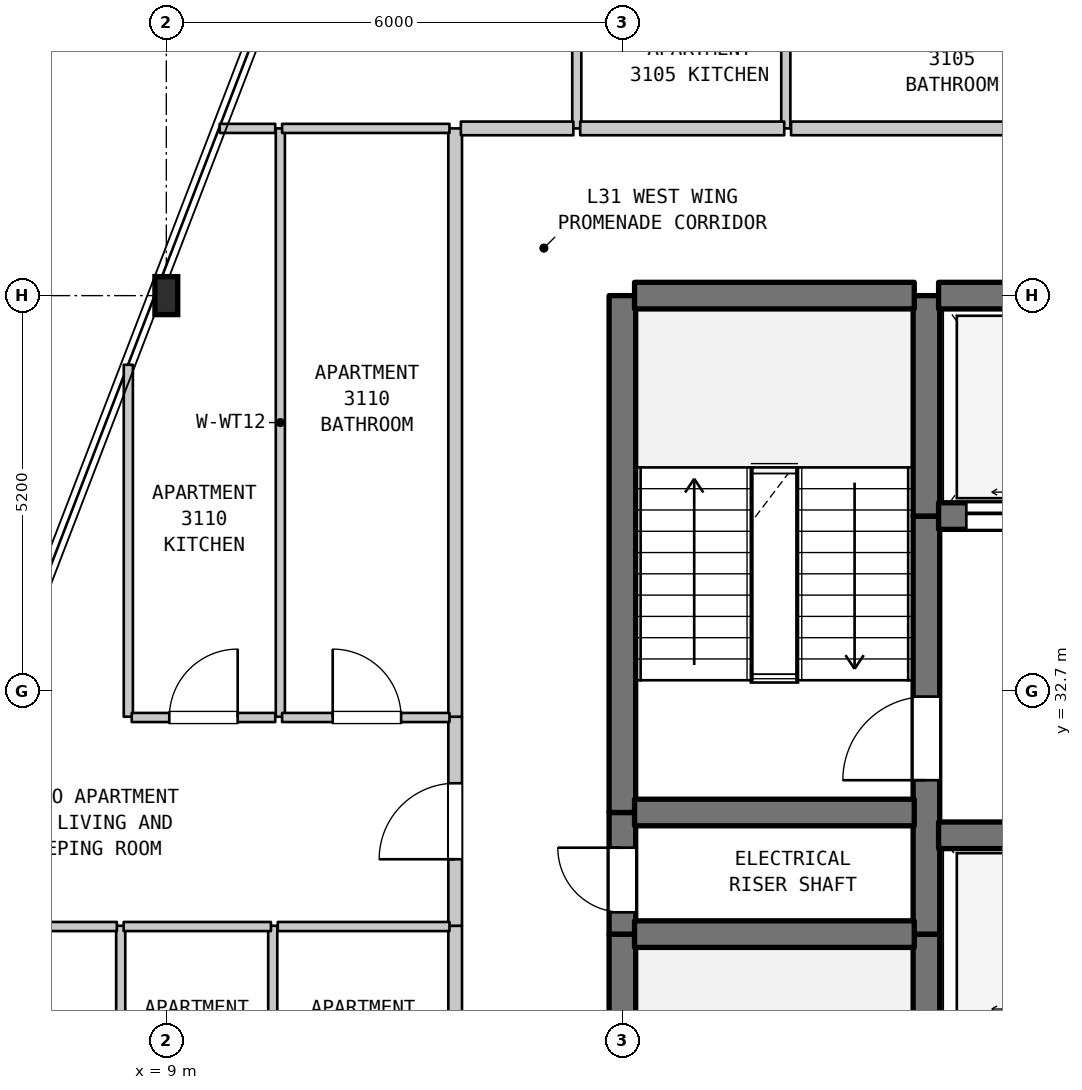
"""IFC4 building model, lengths in metres.
Left out: names, types, materials, properties, quantities, classifications, styles, units other than length and angle.
Written with IfcOpenShell. Run it as: python <this file> out.ifc"""

import sys

from ifc_helpers import new_model, si_unit, direction, frame, frame_2d, origin, origin_2d, place, context, subcontext, project, spatial, rectangle, i_section, extrude, element, fill, save


model = new_model("IFC4")
c1 = context("Model", 3, precision=1e-05, world=origin(), true_north=direction((0.0, 1.0)))
c2 = subcontext(c1, "Body", "Model", "MODEL_VIEW")
j1 = project(units=[si_unit("LENGTHUNIT", "METRE"), si_unit("PLANEANGLEUNIT", "RADIAN")], contexts=[c1])
p1 = place(None, origin())
s1 = spatial("IfcSite", under=j1, at=p1, CompositionType="ELEMENT")
p2 = place(p1, origin())
s2 = spatial("IfcBuilding", under=s1, at=p2, CompositionType="ELEMENT")
p3 = place(p2, frame((0.0, 0.0, 129.8)))
s3 = spatial("IfcBuildingStorey", under=s2, at=p3, CompositionType="ELEMENT", Elevation=129.8)
p4 = place(p3, frame((9.0, 37.9, 0.0), z_axis=(0.0, 0.0, 1.0), x_axis=(1.0, 0.0, 0.0)))
e1 = element("IfcColumn", 1, at=p4, inside=s3, PredefinedType="COLUMN", context=c2, shape_type="SweptSolid", body=[
    extrude(i_section(OverallWidth=0.3, OverallDepth=0.5, WebThickness=0.014, FlangeThickness=0.028, FilletRadius=0.027, at=origin_2d()), origin(), (0.0, 0.0, 1.0), 3.7),
])
p5 = place(p3, frame((8.4, 26.16, 0.0), z_axis=(0.0, 0.0, 1.0), x_axis=(0.0, 1.0, 0.0)))
e2 = element("IfcWall", 2, at=p5, inside=s3, PredefinedType="PARTITIONING", context=c2, shape_type="SweptSolid", body=[
    extrude(rectangle(XDim=3.45, YDim=0.12, at=frame_2d((1.725, 0.0))), origin(), (0.0, 0.0, 1.0), 3.385),
])
p6 = place(p3, frame((8.5, 32.36, 0.0), z_axis=(0.0, 0.0, 1.0), x_axis=(0.0, 1.0, 0.0)))
e3 = element("IfcWall", 3, at=p6, inside=s3, PredefinedType="PARTITIONING", context=c2, shape_type="SweptSolid", body=[
    extrude(rectangle(XDim=4.63, YDim=0.12, at=frame_2d((2.315, 0.0))), origin(), (0.0, 0.0, 1.0), 3.385),
])
p7 = place(p3, frame((10.4, 26.16, 0.0), z_axis=(0.0, 0.0, 1.0), x_axis=(0.0, 1.0, 0.0)))
e4 = element("IfcWall", 4, at=p7, inside=s3, PredefinedType="PARTITIONING", context=c2, shape_type="SweptSolid", body=[
    extrude(rectangle(XDim=3.45, YDim=0.12, at=frame_2d((1.725, 0.0))), origin(), (0.0, 0.0, 1.0), 3.385),
])
p8 = place(p3, frame((10.5, 32.36, 0.0), z_axis=(0.0, 0.0, 1.0), x_axis=(0.0, 1.0, 0.0)))
e5 = element("IfcWall", 5, at=p8, inside=s3, PredefinedType="PARTITIONING", context=c2, shape_type="SweptSolid", body=[
    extrude(rectangle(XDim=7.74, YDim=0.12, at=frame_2d((3.87, 0.0))), origin(), (0.0, 0.0, 1.0), 3.385),
])
p9 = place(p3, frame((12.8, 26.16, 0.0), z_axis=(0.0, 0.0, 1.0), x_axis=(0.0, 1.0, 0.0)))
e6 = element("IfcWall", 6, at=p9, inside=s3, PredefinedType="STANDARD", context=c2, shape_type="SweptSolid", body=[
    extrude(rectangle(XDim=3.45, YDim=0.18, at=frame_2d((1.725, 0.0))), origin(), (0.0, 0.0, 1.0), 3.385),
])
p10 = place(p3, frame((12.8, 29.61, 0.0), z_axis=(0.0, 0.0, 1.0), x_axis=(0.0, 1.0, 0.0)))
e7 = element("IfcWall", 7, at=p10, inside=s3, PredefinedType="STANDARD", context=c2, shape_type="SweptSolid", body=[
    extrude(rectangle(XDim=2.75, YDim=0.18, at=frame_2d((1.375, 0.0))), origin(), (0.0, 0.0, 1.0), 3.385),
])
p11 = place(p10, frame((0.875, 0.0, 0.0)))
e8 = element("IfcOpeningElement", 8, at=p11, cuts=e7, PredefinedType="OPENING", context=c2, shape_type="SweptSolid", body=[
    extrude(rectangle(XDim=1.0, YDim=2.15, at=frame_2d((0.5, 1.075))), frame((0.0, 0.1, 0.0), z_axis=(0.0, -1.0, 0.0), x_axis=(1.0, 0.0, 0.0)), (0.0, 0.0, 1.0), 0.2),
])
p12 = place(p3, frame((12.8, 32.36, 0.0), z_axis=(0.0, 0.0, 1.0), x_axis=(0.0, 1.0, 0.0)))
e9 = element("IfcWall", 9, at=p12, inside=s3, PredefinedType="STANDARD", context=c2, shape_type="SweptSolid", body=[
    extrude(rectangle(XDim=7.74, YDim=0.18, at=frame_2d((3.87, 0.0))), origin(), (0.0, 0.0, 1.0), 3.385),
])
p13 = place(p3, frame((14.4, 40.1, 0.0), z_axis=(0.0, 0.0, 1.0), x_axis=(0.0, 1.0, 0.0)))
e10 = element("IfcWall", 10, at=p13, inside=s3, PredefinedType="PARTITIONING", context=c2, shape_type="SweptSolid", body=[
    extrude(rectangle(XDim=2.3, YDim=0.12, at=frame_2d((1.15, 0.0))), origin(), (0.0, 0.0, 1.0), 3.385),
])
p14 = place(p3, frame((15.0, 22.7, 0.0), z_axis=(0.0, 0.0, 1.0), x_axis=(0.0, 1.0, 0.0)))
e11 = element("IfcWall", 11, at=p14, inside=s3, PredefinedType="SHEAR", context=c2, shape_type="SweptSolid", body=[
    extrude(rectangle(XDim=6.8, YDim=0.35, at=frame_2d((3.4, 0.0))), origin(), (0.0, 0.0, 1.0), 3.385),
])
p15 = place(p3, frame((15.0, 29.5, 0.0), z_axis=(0.0, 0.0, 1.0), x_axis=(0.0, 1.0, 0.0)))
e12 = element("IfcWall", 12, at=p15, inside=s3, PredefinedType="SHEAR", context=c2, shape_type="SweptSolid", body=[
    extrude(rectangle(XDim=1.6, YDim=0.35, at=frame_2d((0.8, 0.0))), origin(), (0.0, 0.0, 1.0), 3.385),
])
p16 = place(p15, frame((0.287, 0.0, 0.0)))
e13 = element("IfcOpeningElement", 13, at=p16, cuts=e12, PredefinedType="OPENING", context=c2, shape_type="SweptSolid", body=[
    extrude(rectangle(XDim=0.85, YDim=2.1, at=frame_2d((0.425, 1.05))), frame((0.0, 0.185, 0.0), z_axis=(0.0, -1.0, 0.0), x_axis=(1.0, 0.0, 0.0)), (0.0, 0.0, 1.0), 0.37),
])
p17 = place(p3, frame((15.0, 31.1, 0.0), z_axis=(0.0, 0.0, 1.0), x_axis=(0.0, 1.0, 0.0)))
e14 = element("IfcWall", 14, at=p17, inside=s3, PredefinedType="SHEAR", context=c2, shape_type="SweptSolid", body=[
    extrude(rectangle(XDim=6.8, YDim=0.35, at=frame_2d((3.4, 0.0))), origin(), (0.0, 0.0, 1.0), 3.385),
])
p18 = place(p3, frame((17.15, 40.1, 0.0), z_axis=(0.0, 0.0, 1.0), x_axis=(0.0, 1.0, 0.0)))
e15 = element("IfcWall", 15, at=p18, inside=s3, PredefinedType="PARTITIONING", context=c2, shape_type="SweptSolid", body=[
    extrude(rectangle(XDim=2.3, YDim=0.12, at=frame_2d((1.15, 0.0))), origin(), (0.0, 0.0, 1.0), 3.385),
])
p19 = place(p3, frame((19.0, 28.2, 0.0), z_axis=(0.0, 0.0, 1.0), x_axis=(0.0, 1.0, 0.0)))
e16 = element("IfcWall", 16, at=p19, inside=s3, PredefinedType="SHEAR", context=c2, shape_type="SweptSolid", body=[
    extrude(rectangle(XDim=1.3, YDim=0.35, at=frame_2d((0.65, 0.0))), origin(), (0.0, 0.0, 1.0), 3.385),
])
p20 = place(p3, frame((19.0, 29.5, 0.0), z_axis=(0.0, 0.0, 1.0), x_axis=(0.0, 1.0, 0.0)))
e17 = element("IfcWall", 17, at=p20, inside=s3, PredefinedType="SHEAR", context=c2, shape_type="SweptSolid", body=[
    extrude(rectangle(XDim=5.5, YDim=0.35, at=frame_2d((2.75, 0.0))), origin(), (0.0, 0.0, 1.0), 3.385),
])
p21 = place(p20, frame((2.025, 0.0, 0.0)))
e18 = element("IfcOpeningElement", 18, at=p21, cuts=e17, PredefinedType="OPENING", context=c2, shape_type="SweptSolid", body=[
    extrude(rectangle(XDim=1.1, YDim=2.15, at=frame_2d((0.55, 1.075))), frame((0.0, 0.185, 0.0), z_axis=(0.0, -1.0, 0.0), x_axis=(1.0, 0.0, 0.0)), (0.0, 0.0, 1.0), 0.37),
])
p22 = place(p3, frame((19.0, 35.0, 0.0), z_axis=(0.0, 0.0, 1.0), x_axis=(0.0, 1.0, 0.0)))
e19 = element("IfcWall", 19, at=p22, inside=s3, PredefinedType="SHEAR", context=c2, shape_type="SweptSolid", body=[
    extrude(rectangle(XDim=2.9, YDim=0.35, at=frame_2d((1.45, 0.0))), origin(), (0.0, 0.0, 1.0), 3.385),
])
p23 = place(p3, frame((15.16, 29.5, 0.0), z_axis=(0.0, 0.0, 1.0), x_axis=(1.0, 0.0, 0.0)))
e20 = element("IfcWall", 20, at=p23, inside=s3, PredefinedType="SHEAR", context=c2, shape_type="SweptSolid", body=[
    extrude(rectangle(XDim=3.68, YDim=0.35, at=frame_2d((1.84, 0.0))), origin(), (0.0, 0.0, 1.0), 3.385),
])
p24 = place(p3, frame((5.664, 29.6, 0.0), z_axis=(0.0, 0.0, 1.0), x_axis=(1.0, 0.0, 0.0)))
e21 = element("IfcWall", 21, at=p24, inside=s3, PredefinedType="PARTITIONING", context=c2, shape_type="SweptSolid", body=[
    extrude(rectangle(XDim=2.685, YDim=0.12, at=frame_2d((1.343, 0.0))), origin(), (0.0, 0.0, 1.0), 3.385),
])
p25 = place(p3, frame((8.439, 29.6, 0.0), z_axis=(0.0, 0.0, 1.0), x_axis=(1.0, 0.0, 0.0)))
e22 = element("IfcWall", 22, at=p25, inside=s3, PredefinedType="PARTITIONING", context=c2, shape_type="SweptSolid", body=[
    extrude(rectangle(XDim=1.937, YDim=0.12, at=frame_2d((0.969, 0.0))), origin(), (0.0, 0.0, 1.0), 3.385),
])
p26 = place(p3, frame((10.466, 29.6, 0.0), z_axis=(0.0, 0.0, 1.0), x_axis=(1.0, 0.0, 0.0)))
e23 = element("IfcWall", 23, at=p26, inside=s3, PredefinedType="PARTITIONING", context=c2, shape_type="SweptSolid", body=[
    extrude(rectangle(XDim=2.259, YDim=0.12, at=frame_2d((1.129, 0.0))), origin(), (0.0, 0.0, 1.0), 3.385),
])
p27 = place(p3, frame((19.16, 30.8, 0.0), z_axis=(0.0, 0.0, 1.0), x_axis=(1.0, 0.0, 0.0)))
e24 = element("IfcWall", 24, at=p27, inside=s3, PredefinedType="SHEAR", context=c2, shape_type="SweptSolid", body=[
    extrude(rectangle(XDim=4.48, YDim=0.35, at=frame_2d((2.24, 0.0))), origin(), (0.0, 0.0, 1.0), 3.385),
])
p28 = place(p3, frame((15.16, 31.1, 0.0), z_axis=(0.0, 0.0, 1.0), x_axis=(1.0, 0.0, 0.0)))
e25 = element("IfcWall", 25, at=p28, inside=s3, PredefinedType="SHEAR", context=c2, shape_type="SweptSolid", body=[
    extrude(rectangle(XDim=3.68, YDim=0.35, at=frame_2d((1.84, 0.0))), origin(), (0.0, 0.0, 1.0), 3.385),
])
p29 = place(p3, frame((8.545, 32.35, 0.0), z_axis=(0.0, 0.0, 1.0), x_axis=(1.0, 0.0, 0.0)))
e26 = element("IfcWall", 26, at=p29, inside=s3, PredefinedType="PARTITIONING", context=c2, shape_type="SweptSolid", body=[
    extrude(rectangle(XDim=1.888, YDim=0.12, at=frame_2d((0.944, 0.0))), origin(), (0.0, 0.0, 1.0), 3.385),
])
p30 = place(p29, frame((0.494, 0.0, 0.0)))
e27 = element("IfcOpeningElement", 27, at=p30, cuts=e26, PredefinedType="OPENING", context=c2, shape_type="SweptSolid", body=[
    extrude(rectangle(XDim=0.9, YDim=2.15, at=frame_2d((0.45, 1.075))), frame((0.0, 0.07, 0.0), z_axis=(0.0, -1.0, 0.0), x_axis=(1.0, 0.0, 0.0)), (0.0, 0.0, 1.0), 0.14),
])
p31 = place(p3, frame((10.523, 32.35, 0.0), z_axis=(0.0, 0.0, 1.0), x_axis=(1.0, 0.0, 0.0)))
e28 = element("IfcWall", 28, at=p31, inside=s3, PredefinedType="PARTITIONING", context=c2, shape_type="SweptSolid", body=[
    extrude(rectangle(XDim=2.202, YDim=0.12, at=frame_2d((1.101, 0.0))), origin(), (0.0, 0.0, 1.0), 3.385),
])
p32 = place(p31, frame((0.666, 0.0, 0.0)))
e29 = element("IfcOpeningElement", 29, at=p32, cuts=e28, PredefinedType="OPENING", context=c2, shape_type="SweptSolid", body=[
    extrude(rectangle(XDim=0.9, YDim=2.1, at=frame_2d((0.45, 1.05))), frame((0.0, 0.07, 0.0), z_axis=(0.0, -1.0, 0.0), x_axis=(1.0, 0.0, 0.0)), (0.0, 0.0, 1.0), 0.14),
])
p33 = place(p3, frame((19.16, 35.0, 0.0), z_axis=(0.0, 0.0, 1.0), x_axis=(1.0, 0.0, 0.0)))
e30 = element("IfcWall", 30, at=p33, inside=s3, PredefinedType="SHEAR", context=c2, shape_type="SweptSolid", body=[
    extrude(rectangle(XDim=4.48, YDim=0.35, at=frame_2d((2.24, 0.0))), origin(), (0.0, 0.0, 1.0), 3.385),
])
p34 = place(p33, frame((0.365, 0.0, 0.0)))
e31 = element("IfcOpeningElement", 31, at=p34, cuts=e30, PredefinedType="OPENING", context=c2, shape_type="SweptSolid", body=[
    extrude(rectangle(XDim=1.35, YDim=2.2, at=frame_2d((0.675, 1.1))), frame((0.0, 0.185, 0.0), z_axis=(0.0, -1.0, 0.0), x_axis=(1.0, 0.0, 0.0)), (0.0, 0.0, 1.0), 0.37),
])
p35 = place(p33, frame((2.765, 0.0, 0.0)))
e32 = element("IfcOpeningElement", 32, at=p35, cuts=e30, PredefinedType="OPENING", context=c2, shape_type="SweptSolid", body=[
    extrude(rectangle(XDim=1.35, YDim=2.2, at=frame_2d((0.675, 1.1))), frame((0.0, 0.185, 0.0), z_axis=(0.0, -1.0, 0.0), x_axis=(1.0, 0.0, 0.0)), (0.0, 0.0, 1.0), 0.37),
])
p36 = place(p3, frame((15.16, 37.9, 0.0), z_axis=(0.0, 0.0, 1.0), x_axis=(1.0, 0.0, 0.0)))
e33 = element("IfcWall", 33, at=p36, inside=s3, PredefinedType="SHEAR", context=c2, shape_type="SweptSolid", body=[
    extrude(rectangle(XDim=3.68, YDim=0.35, at=frame_2d((1.84, 0.0))), origin(), (0.0, 0.0, 1.0), 3.385),
])
p37 = place(p3, frame((19.16, 37.9, 0.0), z_axis=(0.0, 0.0, 1.0), x_axis=(1.0, 0.0, 0.0)))
e34 = element("IfcWall", 34, at=p37, inside=s3, PredefinedType="SHEAR", context=c2, shape_type="SweptSolid", body=[
    extrude(rectangle(XDim=4.48, YDim=0.35, at=frame_2d((2.24, 0.0))), origin(), (0.0, 0.0, 1.0), 3.385),
])
p38 = place(p3, frame((9.702, 40.1, 0.0), z_axis=(0.0, 0.0, 1.0), x_axis=(1.0, 0.0, 0.0)))
e35 = element("IfcWall", 35, at=p38, inside=s3, PredefinedType="PARTITIONING", context=c2, shape_type="SweptSolid", body=[
    extrude(rectangle(XDim=0.731, YDim=0.12, at=frame_2d((0.366, 0.0))), origin(), (0.0, 0.0, 1.0), 3.385),
])
p39 = place(p3, frame((10.523, 40.1, 0.0), z_axis=(0.0, 0.0, 1.0), x_axis=(1.0, 0.0, 0.0)))
e36 = element("IfcWall", 36, at=p39, inside=s3, PredefinedType="PARTITIONING", context=c2, shape_type="SweptSolid", body=[
    extrude(rectangle(XDim=2.202, YDim=0.12, at=frame_2d((1.101, 0.0))), origin(), (0.0, 0.0, 1.0), 3.385),
])
p40 = place(p3, frame((12.875, 40.1, 0.0), z_axis=(0.0, 0.0, 1.0), x_axis=(1.0, 0.0, 0.0)))
e37 = element("IfcWall", 37, at=p40, inside=s3, PredefinedType="STANDARD", context=c2, shape_type="SweptSolid", body=[
    extrude(rectangle(XDim=1.48, YDim=0.18, at=frame_2d((0.74, 0.0))), origin(), (0.0, 0.0, 1.0), 3.385),
])
p41 = place(p3, frame((14.445, 40.1, 0.0), z_axis=(0.0, 0.0, 1.0), x_axis=(1.0, 0.0, 0.0)))
e38 = element("IfcWall", 38, at=p41, inside=s3, PredefinedType="STANDARD", context=c2, shape_type="SweptSolid", body=[
    extrude(rectangle(XDim=2.684, YDim=0.18, at=frame_2d((1.342, 0.0))), origin(), (0.0, 0.0, 1.0), 3.385),
])
p42 = place(p3, frame((17.219, 40.1, 0.0), z_axis=(0.0, 0.0, 1.0), x_axis=(1.0, 0.0, 0.0)))
e39 = element("IfcWall", 39, at=p42, inside=s3, PredefinedType="STANDARD", context=c2, shape_type="SweptSolid", body=[
    extrude(rectangle(XDim=3.166, YDim=0.18, at=frame_2d((1.583, 0.0))), origin(), (0.0, 0.0, 1.0), 3.385),
])
p43 = place(p11, origin())
e40 = element("IfcDoor", 40, at=p43, inside=s3, OperationType="SINGLE_SWING_LEFT", PredefinedType="DOOR", context=c2, shape_type="SweptSolid", body=[
    extrude(rectangle(XDim=1.0, YDim=2.15, at=frame_2d((0.5, 1.075))), frame((0.0, 0.025, 0.0), z_axis=(0.0, -1.0, 0.0), x_axis=(1.0, 0.0, 0.0)), (0.0, 0.0, 1.0), 0.05),
])
fill(e8, e40)
p44 = place(p16, origin())
e41 = element("IfcDoor", 41, at=p44, inside=s3, OperationType="SINGLE_SWING_RIGHT", PredefinedType="DOOR", context=c2, shape_type="SweptSolid", body=[
    extrude(rectangle(XDim=0.85, YDim=2.1, at=frame_2d((0.425, 1.05))), frame((0.0, 0.025, 0.0), z_axis=(0.0, -1.0, 0.0), x_axis=(1.0, 0.0, 0.0)), (0.0, 0.0, 1.0), 0.05),
])
fill(e13, e41)
p45 = place(p21, origin())
e42 = element("IfcDoor", 42, at=p45, inside=s3, OperationType="SINGLE_SWING_LEFT", PredefinedType="DOOR", context=c2, shape_type="SweptSolid", body=[
    extrude(rectangle(XDim=1.1, YDim=2.15, at=frame_2d((0.55, 1.075))), frame((0.0, 0.025, 0.0), z_axis=(0.0, -1.0, 0.0), x_axis=(1.0, 0.0, 0.0)), (0.0, 0.0, 1.0), 0.05),
])
fill(e18, e42)
p46 = place(p30, origin())
e43 = element("IfcDoor", 43, at=p46, inside=s3, OperationType="SINGLE_SWING_RIGHT", PredefinedType="DOOR", context=c2, shape_type="SweptSolid", body=[
    extrude(rectangle(XDim=0.9, YDim=2.15, at=frame_2d((0.45, 1.075))), frame((0.0, 0.025, 0.0), z_axis=(0.0, -1.0, 0.0), x_axis=(1.0, 0.0, 0.0)), (0.0, 0.0, 1.0), 0.05),
])
fill(e27, e43)
p47 = place(p32, origin())
e44 = element("IfcDoor", 44, at=p47, inside=s3, OperationType="SINGLE_SWING_LEFT", PredefinedType="DOOR", context=c2, shape_type="SweptSolid", body=[
    extrude(rectangle(XDim=0.9, YDim=2.1, at=frame_2d((0.45, 1.05))), frame((0.0, 0.025, 0.0), z_axis=(0.0, -1.0, 0.0), x_axis=(1.0, 0.0, 0.0)), (0.0, 0.0, 1.0), 0.05),
])
fill(e29, e44)
p48 = place(p34, origin())
e45 = element("IfcDoor", 45, at=p48, inside=s3, OperationType="DOUBLE_DOOR_SLIDING", PredefinedType="DOOR", context=c2, shape_type="SweptSolid", body=[
    extrude(rectangle(XDim=1.35, YDim=2.2, at=frame_2d((0.675, 1.1))), frame((0.0, 0.025, 0.0), z_axis=(0.0, -1.0, 0.0), x_axis=(1.0, 0.0, 0.0)), (0.0, 0.0, 1.0), 0.05),
])
fill(e31, e45)
save(model, sys.argv[1])
